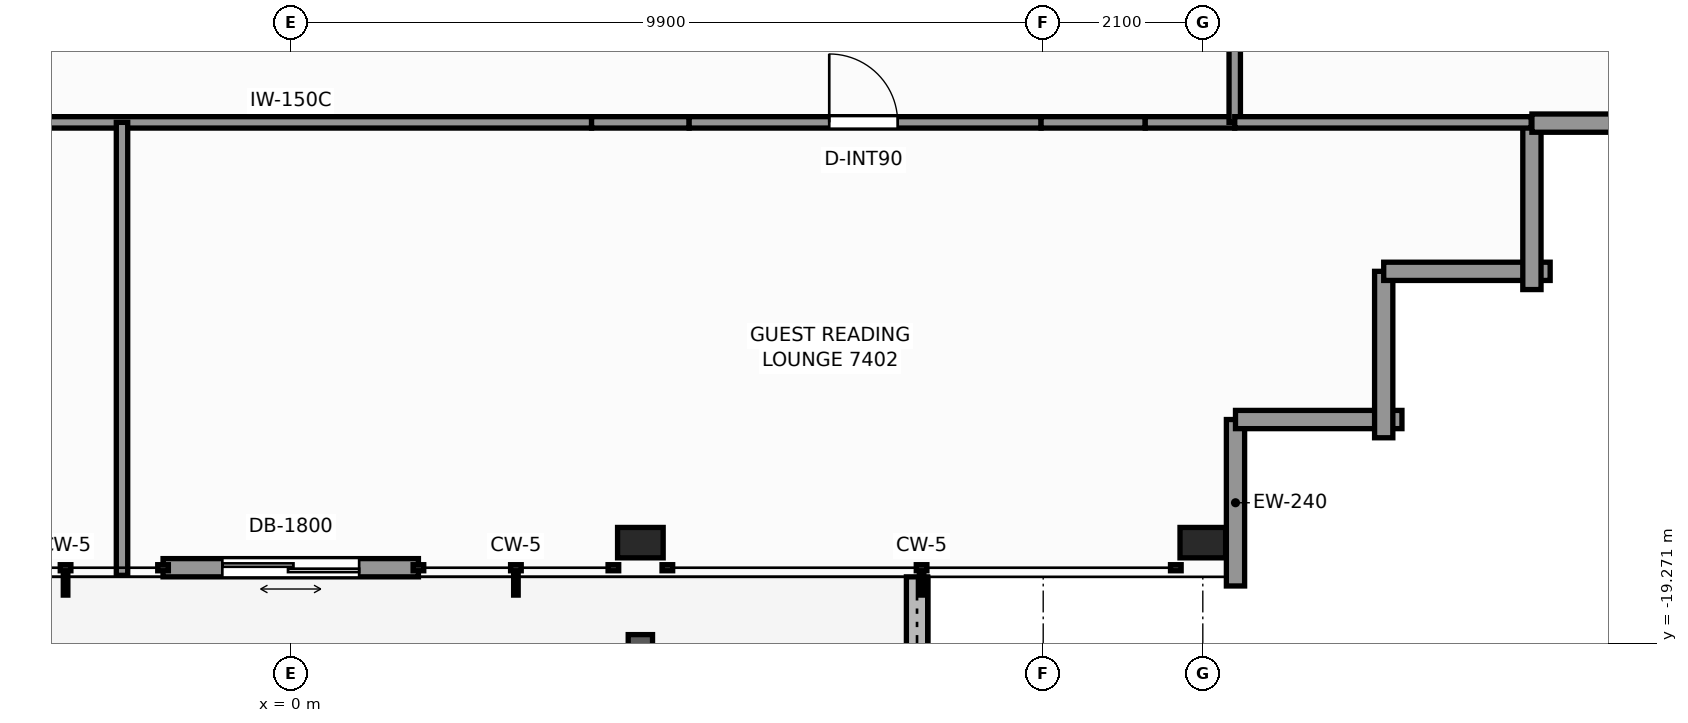
"""IFC4 building model, lengths in metres.
Left out: names, types, materials, properties, quantities, classifications, styles, units other than length and angle.
Written with IfcOpenShell. Run it as: python <this file> out.ifc"""

import sys

from ifc_helpers import new_model, si_unit, direction, frame, frame_2d, origin, origin_2d, place, context, subcontext, project, spatial, rectangle, extrude, element, fill, save


model = new_model("IFC4")
c1 = context("Model", 3, precision=1e-05, world=origin(), true_north=direction((0.0, 1.0)))
c2 = subcontext(c1, "Body", "Model", "MODEL_VIEW")
j1 = project(units=[si_unit("LENGTHUNIT", "METRE"), si_unit("PLANEANGLEUNIT", "RADIAN")], contexts=[c1])
p1 = place(None, origin())
s1 = spatial("IfcSite", under=j1, at=p1, CompositionType="ELEMENT")
p2 = place(p1, origin())
s2 = spatial("IfcBuilding", under=s1, at=p2, CompositionType="ELEMENT")
p3 = place(p2, frame((0.0, 0.0, 254.9)))
s3 = spatial("IfcBuildingStorey", under=s2, at=p3, CompositionType="ELEMENT", Elevation=254.9)
for number, where, z_axis, x_axis in (
    (1, (4.6, -17.95, 0.0), (0.0, 0.0, 1.0), (1.0, 0.0, 0.0)),
    (2, (12.0, -17.95, 0.0), (0.0, 0.0, 1.0), (1.0, 0.0, 0.0)),
):
    element("IfcColumn", number, at=place(p3, frame(where, z_axis=z_axis, x_axis=x_axis)), inside=s3, PredefinedType="COLUMN", context=c2, shape_type="SweptSolid", body=[
        extrude(rectangle(XDim=0.6, YDim=0.4, at=origin_2d()), origin(), (0.0, 0.0, 1.0), 3.5),
    ])
p4 = place(p3, frame((8.24, -19.866, -0.07), z_axis=(0.0, 0.0, 1.0), x_axis=(0.0, 1.0, 0.0)))
e3 = element("IfcWall", 3, at=p4, inside=s3, PredefinedType="PARAPET", context=c2, shape_type="SweptSolid", body=[
    extrude(rectangle(XDim=1.466, YDim=0.28, at=frame_2d((0.733, 0.0))), origin(), (0.0, 0.0, 1.0), 0.42),
])
p5 = place(p3, frame((1.68, -18.28, 0.0), z_axis=(0.0, 0.0, 1.0), x_axis=(-1.0, 0.0, 0.0)))
e4 = element("IfcWall", 4, at=p5, inside=s3, PredefinedType="STANDARD", context=c2, shape_type="SweptSolid", body=[
    extrude(rectangle(XDim=3.36, YDim=0.24, at=frame_2d((1.68, 0.0))), origin(), (0.0, 0.0, 1.0), 3.22),
])
p6 = place(p5, frame((0.78, 0.0, 0.0)))
e5 = element("IfcOpeningElement", 5, at=p6, cuts=e4, PredefinedType="OPENING", context=c2, shape_type="SweptSolid", body=[
    extrude(rectangle(XDim=1.8, YDim=2.2, at=frame_2d((0.9, 1.1))), frame((0.0, 0.13, 0.0), z_axis=(0.0, -1.0, 0.0), x_axis=(1.0, 0.0, 0.0)), (0.0, 0.0, 1.0), 0.26),
])
p7 = place(p3, frame((12.43, -16.33, 0.0), z_axis=(0.0, 0.0, 1.0), x_axis=(0.0, -1.0, 0.0)))
e6 = element("IfcWall", 6, at=p7, inside=s3, PredefinedType="STANDARD", context=c2, shape_type="SweptSolid", body=[
    extrude(rectangle(XDim=2.19, YDim=0.24, at=frame_2d((1.095, 0.0))), origin(), (0.0, 0.0, 1.0), 1.415),
])
for number, where, z_axis, x_axis in (
    (7, (14.62, -16.33, 0.0), (0.0, 0.0, 1.0), (-1.0, 0.0, 0.0)),
    (8, (14.38, -14.38, 0.0), (0.0, 0.0, 1.0), (0.0, -1.0, 0.0)),
    (9, (16.57, -14.38, 0.0), (0.0, 0.0, 1.0), (-1.0, 0.0, 0.0)),
    (10, (16.33, -12.43, 0.0), (0.0, 0.0, 1.0), (0.0, -1.0, 0.0)),
):
    element("IfcWall", number, at=place(p3, frame(where, z_axis=z_axis, x_axis=x_axis)), inside=s3, PredefinedType="STANDARD", context=c2, shape_type="SweptSolid", body=[
        extrude(rectangle(XDim=2.19, YDim=0.24, at=frame_2d((1.095, 0.0))), origin(), (0.0, 0.0, 1.0), 2.603),
    ])
p8 = place(p3, frame((18.52, -12.43, 0.0), z_axis=(0.0, 0.0, 1.0), x_axis=(-1.0, 0.0, 0.0)))
e11 = element("IfcWall", 11, at=p8, inside=s3, PredefinedType="STANDARD", context=c2, shape_type="SweptSolid", body=[
    extrude(rectangle(XDim=2.19, YDim=0.24, at=frame_2d((1.095, 0.0))), origin(), (0.0, 0.0, 1.0), 1.415),
])
p9 = place(p3, frame((-3.958, -12.42, 0.0), z_axis=(0.0, 0.0, 1.0), x_axis=(1.0, 0.0, 0.0)))
e12 = element("IfcWall", 12, at=p9, inside=s3, PredefinedType="PARTITIONING", context=c2, shape_type="SweptSolid", body=[
    extrude(rectangle(XDim=7.916, YDim=0.15, at=frame_2d((3.958, 0.0))), origin(), (0.0, 0.0, 1.0), 2.745),
])
p10 = place(p3, frame((3.958, -12.42, 0.0), z_axis=(0.0, 0.0, 1.0), x_axis=(1.0, 0.0, 0.0)))
e13 = element("IfcWall", 13, at=p10, inside=s3, PredefinedType="PARTITIONING", context=c2, shape_type="SweptSolid", body=[
    extrude(rectangle(XDim=1.284, YDim=0.15, at=frame_2d((0.642, 0.0))), origin(), (0.0, 0.0, 1.0), 1.405),
])
p11 = place(p3, frame((5.242, -12.42, 0.0), z_axis=(0.0, 0.0, 1.0), x_axis=(1.0, 0.0, 0.0)))
e14 = element("IfcWall", 14, at=p11, inside=s3, PredefinedType="PARTITIONING", context=c2, shape_type="SweptSolid", body=[
    extrude(rectangle(XDim=4.63, YDim=0.15, at=frame_2d((2.315, 0.0))), origin(), (0.0, 0.0, 1.0), 3.22),
])
p12 = place(p11, frame((1.843, 0.0, 0.0)))
e15 = element("IfcOpeningElement", 15, at=p12, cuts=e14, PredefinedType="OPENING", context=c2, shape_type="SweptSolid", body=[
    extrude(rectangle(XDim=0.9, YDim=2.06, at=frame_2d((0.45, 1.03))), frame((0.0, 0.085, 0.0), z_axis=(0.0, -1.0, 0.0), x_axis=(1.0, 0.0, 0.0)), (0.0, 0.0, 1.0), 0.17),
])
p13 = place(p3, frame((9.872, -12.42, 0.0), z_axis=(0.0, 0.0, 1.0), x_axis=(1.0, 0.0, 0.0)))
e16 = element("IfcWall", 16, at=p13, inside=s3, PredefinedType="PARTITIONING", context=c2, shape_type="SweptSolid", body=[
    extrude(rectangle(XDim=1.37, YDim=0.15, at=frame_2d((0.685, 0.0))), origin(), (0.0, 0.0, 1.0), 1.405),
])
for number, where, z_axis, x_axis in (
    (17, (11.242, -12.42, 0.0), (0.0, 0.0, 1.0), (1.0, 0.0, 0.0)),
    (18, (12.42, -12.42, 0.0), (0.0, 0.0, 1.0), (0.0, 1.0, 0.0)),
):
    element("IfcWall", number, at=place(p3, frame(where, z_axis=z_axis, x_axis=x_axis)), inside=s3, PredefinedType="PARTITIONING", context=c2, shape_type="SweptSolid", body=[
        extrude(rectangle(XDim=1.177, YDim=0.15, at=frame_2d((0.589, 0.0))), origin(), (0.0, 0.0, 1.0), 3.22),
    ])
p14 = place(p3, frame((12.42, -12.42, 0.0), z_axis=(0.0, 0.0, 1.0), x_axis=(1.0, 0.0, 0.0)))
e19 = element("IfcWall", 19, at=p14, inside=s3, PredefinedType="PARTITIONING", context=c2, shape_type="SweptSolid", body=[
    extrude(rectangle(XDim=3.9, YDim=0.15, at=frame_2d((1.95, 0.0))), origin(), (0.0, 0.0, 1.0), 3.22),
])
p15 = place(p3, frame((-2.22, -18.38, 0.0), z_axis=(0.0, 0.0, 1.0), x_axis=(0.0, 1.0, 0.0)))
e20 = element("IfcWall", 20, at=p15, inside=s3, PredefinedType="PARTITIONING", context=c2, shape_type="SweptSolid", body=[
    extrude(rectangle(XDim=5.96, YDim=0.15, at=frame_2d((2.98, 0.0))), origin(), (0.0, 0.0, 1.0), 2.593),
])
p16 = place(p6, origin())
e21 = element("IfcDoor", 21, at=p16, inside=s3, OperationType="DOUBLE_DOOR_SLIDING", PredefinedType="DOOR", context=c2, shape_type="SweptSolid", body=[
    extrude(rectangle(XDim=1.8, YDim=2.2, at=frame_2d((0.9, 1.1))), frame((0.0, 0.025, 0.0), z_axis=(0.0, -1.0, 0.0), x_axis=(1.0, 0.0, 0.0)), (0.0, 0.0, 1.0), 0.05),
])
fill(e5, e21)
p17 = place(p12, origin())
e22 = element("IfcDoor", 22, at=p17, inside=s3, OperationType="SINGLE_SWING_LEFT", PredefinedType="DOOR", context=c2, shape_type="SweptSolid", body=[
    extrude(rectangle(XDim=0.9, YDim=2.06, at=frame_2d((0.45, 1.03))), frame((0.0, 0.025, 0.0), z_axis=(0.0, -1.0, 0.0), x_axis=(1.0, 0.0, 0.0)), (0.0, 0.0, 1.0), 0.05),
])
fill(e15, e22)
save(model, sys.argv[1])
